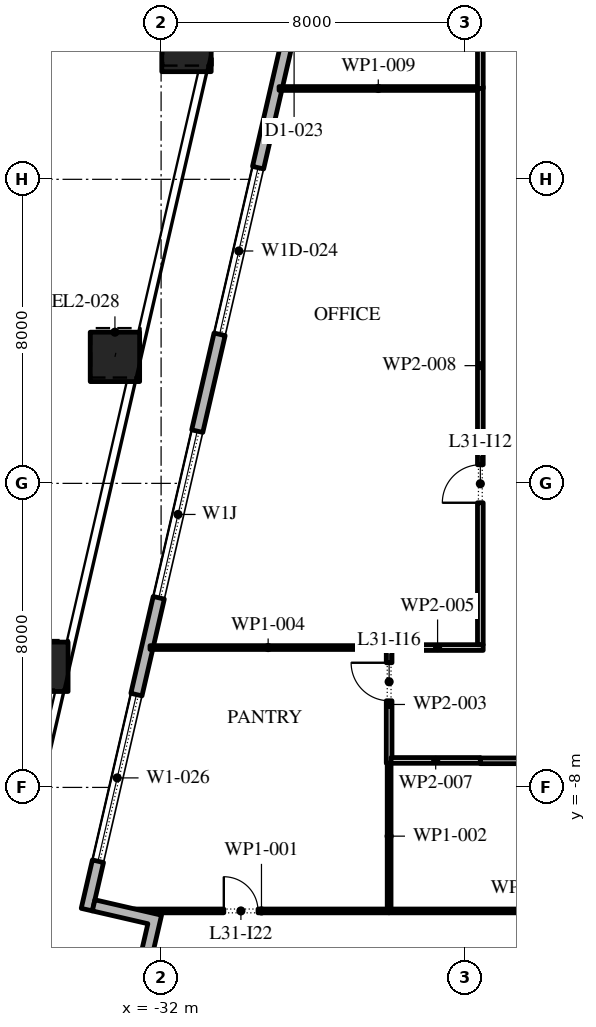
"""IFC4 building model, lengths in metres.
Left out: names, types, materials, properties, quantities, classifications, styles, units other than length and angle.
Written with IfcOpenShell. Run it as: python <this file> out.ifc"""

import sys

from ifc_helpers import new_model, si_unit, direction, frame, frame_2d, origin, origin_2d, place, context, subcontext, project, spatial, polyline, rectangle, outline, extrude, element, fill, save


model = new_model("IFC4")
c1 = context("Model", 3, precision=1e-05, world=origin(), true_north=direction((0.0, 1.0)))
c2 = subcontext(c1, "Body", "Model", "MODEL_VIEW")
j1 = project(units=[si_unit("LENGTHUNIT", "METRE"), si_unit("PLANEANGLEUNIT", "RADIAN")], contexts=[c1])
p1 = place(None, origin())
s1 = spatial("IfcSite", under=j1, at=p1, CompositionType="ELEMENT")
p2 = place(p1, origin())
s2 = spatial("IfcBuilding", under=s1, at=p2, CompositionType="ELEMENT")
p3 = place(p2, frame((0.0, 0.0, 143.4)))
s3 = spatial("IfcBuildingStorey", under=s2, at=p3, CompositionType="ELEMENT", Elevation=143.4)
p4 = place(p3, frame((-31.332, 11.482, 0.0), z_axis=(0.008770375651, 0.037927518544, 0.999242004646), x_axis=(-0.974290512438, 0.225295355862, 0.0)))
e1 = element("IfcColumn", 1, at=p4, inside=s3, PredefinedType="COLUMN", context=c2, shape_type="SweptSolid", body=[
    extrude(rectangle(XDim=1.3, YDim=1.3, at=origin_2d()), origin(), (0.0, 0.0, 1.0), 4.203),
])
p5 = place(p3, frame((-33.215, 3.328, 0.0), z_axis=(0.005868750925, 0.02527630349, 0.999663276431), x_axis=(-0.974088391429, 0.226167649504, 0.0)))
e2 = element("IfcColumn", 2, at=p5, inside=s3, PredefinedType="COLUMN", context=c2, shape_type="SweptSolid", body=[
    extrude(rectangle(XDim=1.3, YDim=1.3, at=origin_2d()), origin(), (0.0, 0.0, 1.0), 4.202),
])
p6 = place(p3, frame((-35.097, -4.826, 0.0), z_axis=(0.00290605529, 0.012670401066, 0.99991550432), x_axis=(-0.974691740237, 0.22355315143, 0.0)))
e3 = element("IfcColumn", 3, at=p6, inside=s3, PredefinedType="COLUMN", context=c2, shape_type="SweptSolid", body=[
    extrude(rectangle(XDim=1.3, YDim=1.3, at=origin_2d()), origin(), (0.0, 0.0, 1.0), 4.2),
])
p7 = place(p3, frame((-22.82, 37.016, 0.0), z_axis=(0.0, 0.0, 1.0), x_axis=(-0.224953880882, -0.974369412223, 0.0)))
e4 = element("IfcWall", 4, at=p7, inside=s3, PredefinedType="STANDARD", context=c2, shape_type="SweptSolid", body=[
    extrude(rectangle(XDim=49.5, YDim=0.3, at=frame_2d((24.75, 0.0))), origin(), (0.0, 0.0, 1.0), 4.0),
])
p8 = place(p7, frame((1.157, 0.0, 0.45)))
e5 = element("IfcOpeningElement", 5, at=p8, cuts=e4, PredefinedType="OPENING", context=c2, shape_type="SweptSolid", body=[
    extrude(rectangle(XDim=4.5, YDim=3.05, at=frame_2d((2.25, 1.525))), frame((0.0, 0.16, 0.0), z_axis=(0.0, -1.0, 0.0), x_axis=(1.0, 0.0, 0.0)), (0.0, 0.0, 1.0), 0.32),
])
p9 = place(p7, frame((8.121, 0.0, 0.45)))
e6 = element("IfcOpeningElement", 6, at=p9, cuts=e4, PredefinedType="OPENING", context=c2, shape_type="SweptSolid", body=[
    extrude(rectangle(XDim=4.5, YDim=3.05, at=frame_2d((2.25, 1.525))), frame((0.0, 0.16, 0.0), z_axis=(0.0, -1.0, 0.0), x_axis=(1.0, 0.0, 0.0)), (0.0, 0.0, 1.0), 0.32),
])
p10 = place(p7, frame((15.236, 0.0, 0.45)))
e7 = element("IfcOpeningElement", 7, at=p10, cuts=e4, PredefinedType="OPENING", context=c2, shape_type="SweptSolid", body=[
    extrude(rectangle(XDim=4.5, YDim=3.05, at=frame_2d((2.25, 1.525))), frame((0.0, 0.16, 0.0), z_axis=(0.0, -1.0, 0.0), x_axis=(1.0, 0.0, 0.0)), (0.0, 0.0, 1.0), 0.32),
])
p11 = place(p7, frame((23.4, 0.0, 0.0)))
e8 = element("IfcOpeningElement", 8, at=p11, cuts=e4, PredefinedType="OPENING", context=c2, shape_type="SweptSolid", body=[
    extrude(rectangle(XDim=2.4, YDim=3.5, at=frame_2d((1.2, 1.75))), frame((0.0, 0.16, 0.0), z_axis=(0.0, -1.0, 0.0), x_axis=(1.0, 0.0, 0.0)), (0.0, 0.0, 1.0), 0.32),
])
p12 = place(p7, frame((29.464, 0.0, 0.45)))
e9 = element("IfcOpeningElement", 9, at=p12, cuts=e4, PredefinedType="OPENING", context=c2, shape_type="SweptSolid", body=[
    extrude(rectangle(XDim=4.5, YDim=2.875, at=frame_2d((2.25, 1.438))), frame((0.0, 0.16, 0.0), z_axis=(0.0, -1.0, 0.0), x_axis=(1.0, 0.0, 0.0)), (0.0, 0.0, 1.0), 0.32),
])
p13 = place(p7, frame((36.579, 0.0, 0.45)))
e10 = element("IfcOpeningElement", 10, at=p13, cuts=e4, PredefinedType="OPENING", context=c2, shape_type="SweptSolid", body=[
    extrude(rectangle(XDim=4.5, YDim=2.675, at=frame_2d((2.25, 1.337))), frame((0.0, 0.16, 0.0), z_axis=(0.0, -1.0, 0.0), x_axis=(1.0, 0.0, 0.0)), (0.0, 0.0, 1.0), 0.32),
])
p14 = place(p7, frame((43.693, 0.0, 0.45)))
e11 = element("IfcOpeningElement", 11, at=p14, cuts=e4, PredefinedType="OPENING", context=c2, shape_type="SweptSolid", body=[
    extrude(rectangle(XDim=4.5, YDim=3.05, at=frame_2d((2.25, 1.525))), frame((0.0, 0.16, 0.0), z_axis=(0.0, -1.0, 0.0), x_axis=(1.0, 0.0, 0.0)), (0.0, 0.0, 1.0), 0.32),
])
p15 = place(p3, origin())
e12 = element("IfcWall", 12, at=p15, inside=s3, PredefinedType="STANDARD", context=c2, shape_type="SweptSolid", body=[
    extrude(outline(polyline([(-32.393, -13.116), (-30.639, -13.521), (-31.111, -15.567), (-31.404, -15.5), (-30.999, -13.746), (-32.753, -13.341), (-32.348, -11.587), (-33.809, -11.25), (-33.742, -10.957), (-31.988, -11.362), (-32.393, -13.116)])), origin(), (0.0, 0.0, 1.0), 4.0),
])
p16 = place(p3, frame((-26.0, -11.25, 0.0), z_axis=(0.0, 0.0, 1.0), x_axis=(-1.0, 0.0, 0.0)))
e13 = element("IfcWall", 13, at=p16, inside=s3, PredefinedType="PARTITIONING", context=c2, shape_type="SweptSolid", body=[
    extrude(rectangle(XDim=6.718, YDim=0.1, at=frame_2d((3.359, 0.0))), origin(), (0.0, 0.0, 1.0), 4.0),
])
p17 = place(p16, frame((3.45, 0.0, 0.0)))
e14 = element("IfcOpeningElement", 14, at=p17, cuts=e13, PredefinedType="OPENING", context=c2, shape_type="SweptSolid", body=[
    extrude(rectangle(XDim=0.9, YDim=2.1, at=frame_2d((0.45, 1.05))), frame((0.0, 0.06, 0.0), z_axis=(0.0, -1.0, 0.0), x_axis=(1.0, 0.0, 0.0)), (0.0, 0.0, 1.0), 0.12),
])
p18 = place(p3, frame((-26.0, -11.2, 0.0), z_axis=(0.0, 0.0, 1.0), x_axis=(0.0, 1.0, 0.0)))
e15 = element("IfcWall", 15, at=p18, inside=s3, PredefinedType="PARTITIONING", context=c2, shape_type="SweptSolid", body=[
    extrude(rectangle(XDim=3.835, YDim=0.1, at=frame_2d((1.917, 0.0))), origin(), (0.0, 0.0, 1.0), 4.0),
])
p19 = place(p3, frame((-26.0, -7.365, 0.0), z_axis=(0.0, 0.0, 1.0), x_axis=(0.0, 1.0, 0.0)))
e16 = element("IfcWall", 16, at=p19, inside=s3, PredefinedType="PARTITIONING", context=c2, shape_type="SweptSolid", body=[
    extrude(rectangle(XDim=3.095, YDim=0.15, at=frame_2d((1.547, 0.0))), origin(), (0.0, 0.0, 1.0), 4.0),
])
p20 = place(p19, frame((1.645, 0.0, 0.0)))
e17 = element("IfcOpeningElement", 17, at=p20, cuts=e16, PredefinedType="OPENING", context=c2, shape_type="SweptSolid", body=[
    extrude(rectangle(XDim=1.0, YDim=2.1, at=frame_2d((0.5, 1.05))), frame((0.0, 0.085, 0.0), z_axis=(0.0, -1.0, 0.0), x_axis=(1.0, 0.0, 0.0)), (0.0, 0.0, 1.0), 0.17),
])
p21 = place(p3, frame((-26.075, -4.32, 0.0), z_axis=(0.0, 0.0, 1.0), x_axis=(-1.0, 0.0, 0.0)))
e18 = element("IfcWall", 18, at=p21, inside=s3, PredefinedType="PARTITIONING", context=c2, shape_type="SweptSolid", body=[
    extrude(rectangle(XDim=6.217, YDim=0.1, at=frame_2d((3.108, 0.0))), origin(), (0.0, 0.0, 1.0), 4.0),
])
p22 = place(p3, frame((-25.925, -4.32, 0.0), z_axis=(0.0, 0.0, 1.0), x_axis=(1.0, 0.0, 0.0)))
e19 = element("IfcWall", 19, at=p22, inside=s3, PredefinedType="PARTITIONING", context=c2, shape_type="SweptSolid", body=[
    extrude(rectangle(XDim=2.4, YDim=0.15, at=frame_2d((1.2, 0.0))), origin(), (0.0, 0.0, 1.0), 4.0),
])
p23 = place(p3, frame((-23.6, -7.29, 0.0), z_axis=(0.0, 0.0, 1.0), x_axis=(-1.0, 0.0, 0.0)))
e20 = element("IfcWall", 20, at=p23, inside=s3, PredefinedType="PARTITIONING", context=c2, shape_type="SweptSolid", body=[
    extrude(rectangle(XDim=2.35, YDim=0.15, at=frame_2d((1.175, 0.0))), origin(), (0.0, 0.0, 1.0), 4.0),
])
p24 = place(p3, frame((-23.6, -4.245, 0.0), z_axis=(0.0, 0.0, 1.0), x_axis=(0.0, 1.0, 0.0)))
e21 = element("IfcWall", 21, at=p24, inside=s3, PredefinedType="PARTITIONING", context=c2, shape_type="SweptSolid", body=[
    extrude(rectangle(XDim=14.685, YDim=0.15, at=frame_2d((7.343, 0.0))), origin(), (0.0, 0.0, 1.0), 4.0),
])
p25 = place(p24, frame((3.735, 0.0, 0.0)))
e22 = element("IfcOpeningElement", 22, at=p25, cuts=e21, PredefinedType="OPENING", context=c2, shape_type="SweptSolid", body=[
    extrude(rectangle(XDim=1.0, YDim=2.1, at=frame_2d((0.5, 1.05))), frame((0.0, 0.085, 0.0), z_axis=(0.0, -1.0, 0.0), x_axis=(1.0, 0.0, 0.0)), (0.0, 0.0, 1.0), 0.17),
])
p26 = place(p3, frame((-23.675, 10.39, 0.0), z_axis=(0.0, 0.0, 1.0), x_axis=(-1.0, 0.0, 0.0)))
e23 = element("IfcWall", 23, at=p26, inside=s3, PredefinedType="PARTITIONING", context=c2, shape_type="SweptSolid", body=[
    extrude(rectangle(XDim=5.221, YDim=0.1, at=frame_2d((2.61, 0.0))), origin(), (0.0, 0.0, 1.0), 4.0),
])
p27 = place(p3, frame((-23.6, 10.39, 0.0), z_axis=(0.0, 0.0, 1.0), x_axis=(0.0, 1.0, 0.0)))
e24 = element("IfcWall", 24, at=p27, inside=s3, PredefinedType="PARTITIONING", context=c2, shape_type="SweptSolid", body=[
    extrude(rectangle(XDim=13.095, YDim=0.15, at=frame_2d((6.548, 0.0))), origin(), (0.0, 0.0, 1.0), 4.0),
])
p28 = place(p27, frame((8.62, 0.0, 0.0)))
e25 = element("IfcOpeningElement", 25, at=p28, cuts=e24, PredefinedType="OPENING", context=c2, shape_type="SweptSolid", body=[
    extrude(rectangle(XDim=1.0, YDim=2.1, at=frame_2d((0.5, 1.05))), frame((0.0, 0.085, 0.0), z_axis=(0.0, -1.0, 0.0), x_axis=(1.0, 0.0, 0.0)), (0.0, 0.0, 1.0), 0.17),
])
p29 = place(p3, frame((-18.7, -11.25, 0.0), z_axis=(0.0, 0.0, 1.0), x_axis=(-1.0, 0.0, 0.0)))
e26 = element("IfcWall", 26, at=p29, inside=s3, PredefinedType="PARTITIONING", context=c2, shape_type="SweptSolid", body=[
    extrude(rectangle(XDim=7.3, YDim=0.1, at=frame_2d((3.65, 0.0))), origin(), (0.0, 0.0, 1.0), 4.0),
])
p30 = place(p3, frame((-8.325, -7.3, 0.0), z_axis=(0.0, 0.0, 1.0), x_axis=(-1.0, 0.0, 0.0)))
e27 = element("IfcWall", 27, at=p30, inside=s3, PredefinedType="PARTITIONING", context=c2, shape_type="SweptSolid", body=[
    extrude(rectangle(XDim=15.275, YDim=0.15, at=frame_2d((7.638, 0.0))), origin(), (0.0, 0.0, 1.0), 4.0),
])
p31 = place(p30, frame((5.625, 0.0, 0.0)))
e28 = element("IfcOpeningElement", 28, at=p31, cuts=e27, PredefinedType="OPENING", context=c2, shape_type="SweptSolid", body=[
    extrude(rectangle(XDim=1.0, YDim=2.1, at=frame_2d((0.5, 1.05))), frame((0.0, 0.085, 0.0), z_axis=(0.0, -1.0, 0.0), x_axis=(1.0, 0.0, 0.0)), (0.0, 0.0, 1.0), 0.17),
])
p32 = place(p12, origin())
e29 = element("IfcWindow", 29, at=p32, inside=s3, PartitioningType="DOUBLE_PANEL_VERTICAL", PredefinedType="WINDOW", context=c2, shape_type="SweptSolid", body=[
    extrude(rectangle(XDim=4.5, YDim=2.875, at=frame_2d((2.25, 1.438))), frame((0.0, 0.03, 0.0), z_axis=(0.0, -1.0, 0.0), x_axis=(1.0, 0.0, 0.0)), (0.0, 0.0, 1.0), 0.06),
])
fill(e9, e29)
p33 = place(p13, origin())
e30 = element("IfcWindow", 30, at=p33, inside=s3, PartitioningType="DOUBLE_PANEL_VERTICAL", PredefinedType="WINDOW", context=c2, shape_type="SweptSolid", body=[
    extrude(rectangle(XDim=4.5, YDim=2.675, at=frame_2d((2.25, 1.337))), frame((0.0, 0.03, 0.0), z_axis=(0.0, -1.0, 0.0), x_axis=(1.0, 0.0, 0.0)), (0.0, 0.0, 1.0), 0.06),
])
fill(e10, e30)
p34 = place(p14, origin())
e31 = element("IfcWindow", 31, at=p34, inside=s3, PartitioningType="DOUBLE_PANEL_VERTICAL", PredefinedType="WINDOW", context=c2, shape_type="SweptSolid", body=[
    extrude(rectangle(XDim=4.5, YDim=3.05, at=frame_2d((2.25, 1.525))), frame((0.0, 0.03, 0.0), z_axis=(0.0, -1.0, 0.0), x_axis=(1.0, 0.0, 0.0)), (0.0, 0.0, 1.0), 0.06),
])
fill(e11, e31)
p35 = place(p25, origin())
e32 = element("IfcDoor", 32, at=p35, inside=s3, OperationType="SINGLE_SWING_RIGHT", PredefinedType="DOOR", context=c2, shape_type="SweptSolid", body=[
    extrude(rectangle(XDim=1.0, YDim=2.1, at=frame_2d((0.5, 1.05))), frame((0.0, 0.025, 0.0), z_axis=(0.0, -1.0, 0.0), x_axis=(1.0, 0.0, 0.0)), (0.0, 0.0, 1.0), 0.05),
])
fill(e22, e32)
p36 = place(p20, origin())
e33 = element("IfcDoor", 33, at=p36, inside=s3, OperationType="SINGLE_SWING_LEFT", PredefinedType="DOOR", context=c2, shape_type="SweptSolid", body=[
    extrude(rectangle(XDim=1.0, YDim=2.1, at=frame_2d((0.5, 1.05))), frame((0.0, 0.025, 0.0), z_axis=(0.0, -1.0, 0.0), x_axis=(1.0, 0.0, 0.0)), (0.0, 0.0, 1.0), 0.05),
])
fill(e17, e33)
p37 = place(p17, frame((0.9, 0.0, 0.0), z_axis=(0.0, 0.0, 1.0), x_axis=(-1.0, 0.0, 0.0)))
e34 = element("IfcDoor", 34, at=p37, inside=s3, OperationType="SINGLE_SWING_RIGHT", PredefinedType="DOOR", context=c2, shape_type="SweptSolid", body=[
    extrude(rectangle(XDim=0.9, YDim=2.1, at=frame_2d((0.45, 1.05))), frame((0.0, 0.025, 0.0), z_axis=(0.0, -1.0, 0.0), x_axis=(1.0, 0.0, 0.0)), (0.0, 0.0, 1.0), 0.05),
])
fill(e14, e34)
save(model, sys.argv[1])
